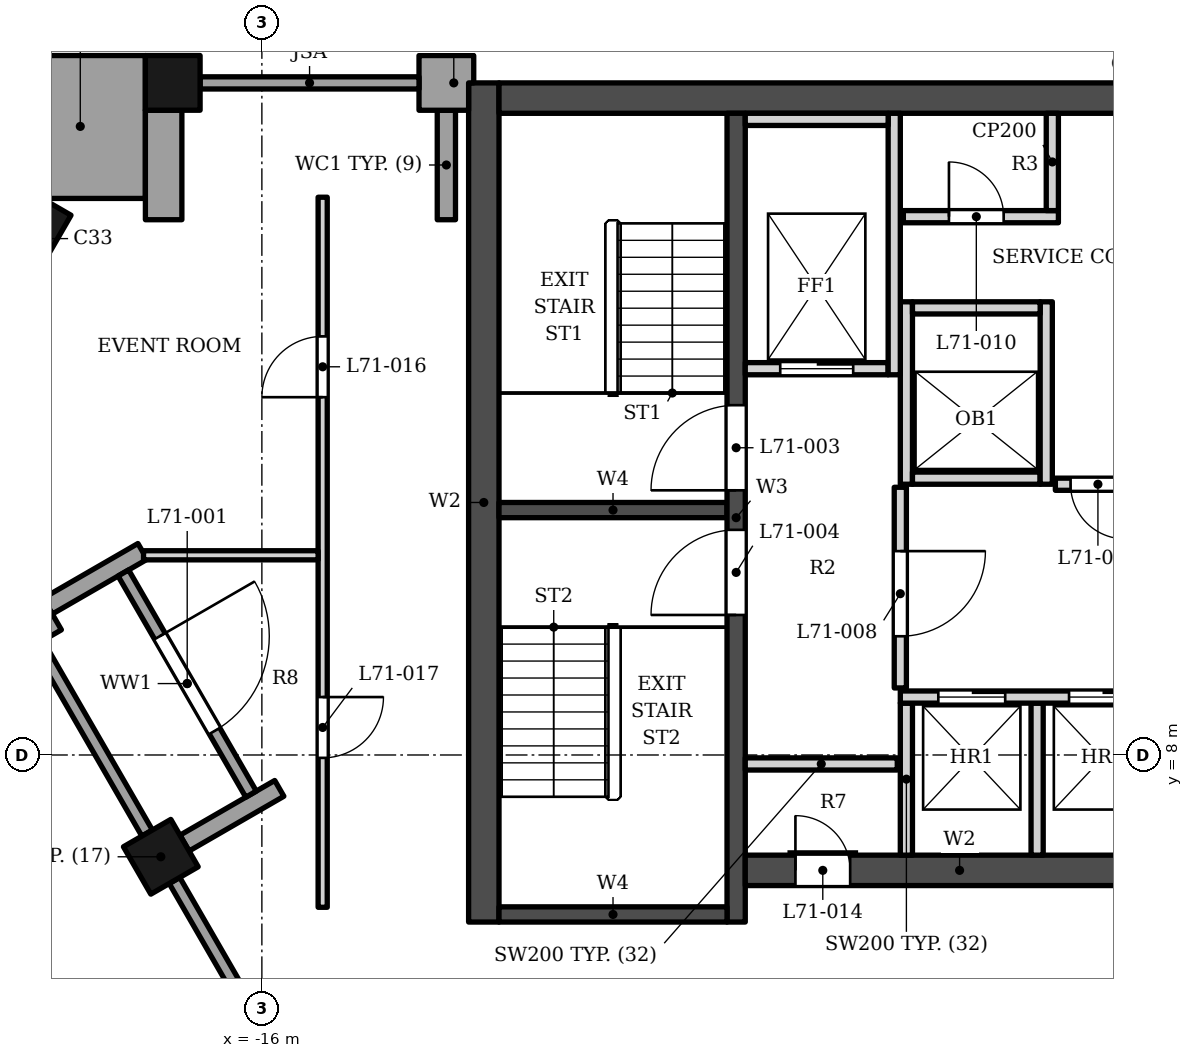
"""IFC4 building model, lengths in metres.
Left out: names, types, materials, properties, quantities, classifications, styles, units other than length and angle.
Written with IfcOpenShell. Run it as: python <this file> out.ifc"""

import sys

from ifc_helpers import new_model, si_unit, direction, frame, frame_2d, origin, origin_2d, place, context, subcontext, project, spatial, polyline, rectangle, outline, extrude, element, fill, save


model = new_model("IFC4")
c1 = context("Model", 3, precision=1e-05, world=origin(), true_north=direction((0.0, 1.0)))
c2 = subcontext(c1, "Body", "Model", "MODEL_VIEW")
j1 = project(units=[si_unit("LENGTHUNIT", "METRE"), si_unit("PLANEANGLEUNIT", "RADIAN")], contexts=[c1])
p1 = place(None, origin())
s1 = spatial("IfcSite", under=j1, at=p1, CompositionType="ELEMENT")
p2 = place(p1, origin())
s2 = spatial("IfcBuilding", under=s1, at=p2, CompositionType="ELEMENT")
p3 = place(p2, frame((0.0, 0.0, 295.0)))
s3 = spatial("IfcBuildingStorey", under=s2, at=p3, CompositionType="ELEMENT", Elevation=295.0)
p4 = place(p3, frame((-12.1, 18.802, 0.0), z_axis=(0.0, 0.0, 1.0), x_axis=(1.0, 0.0, 0.0)))
e1 = element("IfcWall", 1, at=p4, inside=s3, PredefinedType="SHEAR", context=c2, shape_type="SweptSolid", body=[
    extrude(rectangle(XDim=24.2, YDim=0.5, at=frame_2d((12.1, 0.0))), origin(), (0.0, 0.0, 1.0), 7.5),
])
p5 = place(p3, frame((-12.35, 5.253, 0.0), z_axis=(0.0, 0.0, 1.0), x_axis=(0.0, 1.0, 0.0)))
e2 = element("IfcWall", 2, at=p5, inside=s3, PredefinedType="SHEAR", context=c2, shape_type="SweptSolid", body=[
    extrude(rectangle(XDim=13.8, YDim=0.5, at=frame_2d((6.9, 0.0))), origin(), (0.0, 0.0, 1.0), 7.5),
])
p6 = place(p3, frame((-8.2, 5.253, 0.0), z_axis=(0.0, 0.0, 1.0), x_axis=(0.0, 1.0, 0.0)))
e3 = element("IfcWall", 3, at=p6, inside=s3, PredefinedType="SHEAR", context=c2, shape_type="SweptSolid", body=[
    extrude(rectangle(XDim=13.3, YDim=0.3, at=frame_2d((6.65, 0.0))), origin(), (0.0, 0.0, 1.0), 7.5),
])
p7 = place(p6, frame((7.1, 0.0, 0.0)))
e4 = element("IfcOpeningElement", 4, at=p7, cuts=e3, PredefinedType="OPENING", context=c2, shape_type="SweptSolid", body=[
    extrude(rectangle(XDim=1.4, YDim=2.1, at=frame_2d((0.7, 1.05))), frame((0.0, 0.16, 0.0), z_axis=(0.0, -1.0, 0.0), x_axis=(1.0, 0.0, 0.0)), (0.0, 0.0, 1.0), 0.32),
])
p8 = place(p6, frame((5.05, 0.0, 0.0)))
e5 = element("IfcOpeningElement", 5, at=p8, cuts=e3, PredefinedType="OPENING", context=c2, shape_type="SweptSolid", body=[
    extrude(rectangle(XDim=1.4, YDim=2.1, at=frame_2d((0.7, 1.05))), frame((0.0, 0.16, 0.0), z_axis=(0.0, -1.0, 0.0), x_axis=(1.0, 0.0, 0.0)), (0.0, 0.0, 1.0), 0.32),
])
for number, where, z_axis, x_axis in (
    (6, (-12.1, 12.028, 0.0), (0.0, 0.0, 1.0), (1.0, 0.0, 0.0)),
    (7, (-12.1, 5.378, 0.0), (0.0, 0.0, 1.0), (1.0, 0.0, 0.0)),
):
    element("IfcWall", number, at=place(p3, frame(where, z_axis=z_axis, x_axis=x_axis)), inside=s3, PredefinedType="SHEAR", context=c2, shape_type="SweptSolid", body=[
        extrude(rectangle(XDim=3.75, YDim=0.25, at=frame_2d((1.875, 0.0))), origin(), (0.0, 0.0, 1.0), 7.5),
    ])
p9 = place(p3, frame((-8.05, 6.103, 0.0), z_axis=(0.0, 0.0, 1.0), x_axis=(1.0, 0.0, 0.0)))
e8 = element("IfcWall", 8, at=p9, inside=s3, PredefinedType="SHEAR", context=c2, shape_type="SweptSolid", body=[
    extrude(rectangle(XDim=7.05, YDim=0.5, at=frame_2d((3.525, 0.0))), origin(), (0.0, 0.0, 1.0), 7.5),
])
p10 = place(p9, frame((0.825, 0.0, 0.0)))
e9 = element("IfcOpeningElement", 9, at=p10, cuts=e8, PredefinedType="OPENING", context=c2, shape_type="SweptSolid", body=[
    extrude(rectangle(XDim=0.9, YDim=2.1, at=frame_2d((0.45, 1.05))), frame((0.0, 0.26, 0.0), z_axis=(0.0, -1.0, 0.0), x_axis=(1.0, 0.0, 0.0)), (0.0, 0.0, 1.0), 0.52),
])
p11 = place(p3, frame((-20.573, 16.492, 0.0), z_axis=(0.0, 0.0, 1.0), x_axis=(0.866025395058, -0.500000015115, 0.0)))
e10 = element("IfcColumn", 10, at=p11, inside=s3, PredefinedType="COLUMN", context=c2, shape_type="SweptSolid", body=[
    extrude(rectangle(XDim=2.1, YDim=2.1, at=origin_2d()), origin(), (0.0, 0.0, 1.0), 7.5),
])
for number, where, z_axis, x_axis in (
    (11, (-17.662, 6.326, 0.0), (0.0, 0.0, 1.0), (0.5, -0.866, 0.0)),
    (12, (-17.466, 19.053, 0.0), (0.0, 0.0, 1.0), (-1.0, 0.0, 0.0)),
):
    element("IfcColumn", number, at=place(p3, frame(where, z_axis=z_axis, x_axis=x_axis)), inside=s3, PredefinedType="COLUMN", context=c2, shape_type="SweptSolid", body=[
        extrude(rectangle(XDim=0.9, YDim=0.9, at=origin_2d()), origin(), (0.0, 0.0, 1.0), 7.5),
    ])
p12 = place(p3, frame((-20.302, 9.998, 0.0), z_axis=(0.0, 0.0, 1.0), x_axis=(0.866013897511, 0.50001992892, 0.0)))
e13 = element("IfcWall", 13, at=p12, inside=s3, PredefinedType="SOLIDWALL", context=c2, shape_type="SweptSolid", body=[
    extrude(rectangle(XDim=0.9, YDim=0.9, at=frame_2d((0.45, 0.0))), origin(), (0.0, 0.0, 1.0), 6.5),
])
p13 = place(p3, frame((-17.963, 11.348, 0.0), z_axis=(0.0, 0.0, 1.0), x_axis=(-0.866047807691, -0.499961193289, 0.0)))
e14 = element("IfcWall", 14, at=p13, inside=s3, PredefinedType="SOLIDWALL", context=c2, shape_type="SweptSolid", body=[
    extrude(rectangle(XDim=1.8, YDim=0.3, at=frame_2d((0.9, 0.0))), origin(), (0.0, 0.0, 1.0), 6.5),
])
p14 = place(p3, frame((-17.272, 6.551, 0.0), z_axis=(0.0, 0.0, 1.0), x_axis=(0.865989075817, 0.500062916607, 0.0)))
e15 = element("IfcWall", 15, at=p14, inside=s3, PredefinedType="SOLIDWALL", context=c2, shape_type="SweptSolid", body=[
    extrude(rectangle(XDim=1.8, YDim=0.3, at=frame_2d((0.9, 0.0))), origin(), (0.0, 0.0, 1.0), 6.42),
])
p15 = place(p3, frame((-19.687, 9.833, 0.0), z_axis=(0.0, 0.0, 1.0), x_axis=(0.499961193289, -0.866047807691, 0.0)))
e16 = element("IfcWall", 16, at=p15, inside=s3, PredefinedType="SOLIDWALL", context=c2, shape_type="SweptSolid", body=[
    extrude(rectangle(XDim=3.6, YDim=0.2, at=frame_2d((1.8, 0.0))), origin(), (0.0, 0.0, 1.0), 6.5),
])
p16 = place(p3, frame((-18.278, 10.993, 0.0), z_axis=(0.0, 0.0, 1.0), x_axis=(0.500002543286, -0.866023935413, 0.0)))
e17 = element("IfcWall", 17, at=p16, inside=s3, PredefinedType="ELEMENTEDWALL", context=c2, shape_type="SweptSolid", body=[
    extrude(rectangle(XDim=4.2, YDim=0.2, at=frame_2d((2.1, 0.0))), origin(), (0.0, 0.0, 1.0), 6.5),
])
p17 = place(p16, frame((1.2, 0.0, 0.0)))
e18 = element("IfcOpeningElement", 18, at=p17, cuts=e17, PredefinedType="OPENING", context=c2, shape_type="SweptSolid", body=[
    extrude(rectangle(XDim=1.8, YDim=2.7, at=frame_2d((0.9, 1.35))), frame((0.0, 0.11, 0.0), z_axis=(0.0, -1.0, 0.0), x_axis=(1.0, 0.0, 0.0)), (0.0, 0.0, 1.0), 0.22),
])
p18 = place(p3, frame((-17.437, 5.936, 0.0), z_axis=(0.0, 0.0, 1.0), x_axis=(0.499961193289, -0.866047807691, 0.0)))
e19 = element("IfcWall", 19, at=p18, inside=s3, PredefinedType="SOLIDWALL", context=c2, shape_type="SweptSolid", body=[
    extrude(rectangle(XDim=3.6, YDim=0.2, at=frame_2d((1.8, 0.0))), origin(), (0.0, 0.0, 1.0), 6.5),
])
p19 = place(p3, origin())
e20 = element("IfcWall", 20, at=p19, inside=s3, PredefinedType="SOLIDWALL", context=c2, shape_type="SweptSolid", body=[
    extrude(outline(polyline([(-12.516, 19.052), (-12.516, 19.502), (-13.416, 19.502), (-13.416, 18.603), (-12.6, 18.603), (-12.6, 19.052), (-12.516, 19.052)])), origin(), (0.0, 0.0, 1.0), 6.5),
])
p20 = place(p3, origin())
e21 = element("IfcWall", 21, at=p20, inside=s3, PredefinedType="SOLIDWALL", context=c2, shape_type="SweptSolid", body=[
    extrude(outline(polyline([(-12.816, 16.802), (-12.816, 18.603), (-13.116, 18.603), (-13.116, 16.802), (-12.816, 16.802)])), origin(), (0.0, 0.0, 1.0), 6.5),
])
p21 = place(p3, origin())
e22 = element("IfcWall", 22, at=p21, inside=s3, PredefinedType="SOLIDWALL", context=c2, shape_type="SweptSolid", body=[
    extrude(outline(polyline([(-17.916, 18.603), (-17.916, 16.802), (-17.316, 16.802), (-17.316, 18.603), (-17.916, 18.603)])), origin(), (0.0, 0.0, 1.0), 6.5),
])
p22 = place(p3, frame((-13.416, 19.052, 0.0), z_axis=(0.0, 0.0, 1.0), x_axis=(-1.0, 0.0, 0.0)))
e23 = element("IfcWall", 23, at=p22, inside=s3, PredefinedType="SOLIDWALL", context=c2, shape_type="SweptSolid", body=[
    extrude(rectangle(XDim=3.6, YDim=0.2, at=frame_2d((1.8, 0.0))), origin(), (0.0, 0.0, 1.0), 6.5),
])
p23 = place(p3, origin())
e24 = element("IfcWall", 24, at=p23, inside=s3, PredefinedType="SOLIDWALL", context=c2, shape_type="SweptSolid", body=[
    extrude(outline(polyline([(-19.617, 17.153), (-17.916, 17.153), (-17.916, 18.603), (-17.916, 18.603), (-17.916, 19.502), (-20.813, 19.502), (-20.813, 17.843), (-19.617, 17.153)])), origin(), (0.0, 0.0, 1.0), 6.5),
])
for number, where, z_axis, x_axis in (
    (25, (-5.4, 6.353, 0.0), (0.0, 0.0, 1.0), (0.0, 1.0, 0.0)),
    (26, (-3.25, 6.353, 0.0), (0.0, 0.0, 1.0), (0.0, 1.0, 0.0)),
    (27, (-8.05, 7.853, 0.0), (0.0, 0.0, 1.0), (1.0, 0.0, 0.0)),
):
    element("IfcWall", number, at=place(p3, frame(where, z_axis=z_axis, x_axis=x_axis)), inside=s3, PredefinedType="SOLIDWALL", context=c2, shape_type="SweptSolid", body=[
        extrude(rectangle(XDim=2.5, YDim=0.2, at=frame_2d((1.25, 0.0))), origin(), (0.0, 0.0, 1.0), 7.2),
    ])
p24 = place(p3, frame((-5.5, 8.953, 0.0), z_axis=(0.0, 0.0, 1.0), x_axis=(1.0, 0.0, 0.0)))
e28 = element("IfcWall", 28, at=p24, inside=s3, PredefinedType="SOLIDWALL", context=c2, shape_type="SweptSolid", body=[
    extrude(rectangle(XDim=4.5, YDim=0.2, at=frame_2d((2.25, 0.0))), origin(), (0.0, 0.0, 1.0), 7.2),
])
p25 = place(p24, frame((0.625, 0.0, 0.0)))
e29 = element("IfcOpeningElement", 29, at=p25, cuts=e28, PredefinedType="OPENING", context=c2, shape_type="SweptSolid", body=[
    extrude(rectangle(XDim=1.1, YDim=2.1, at=frame_2d((0.55, 1.05))), frame((0.0, 0.11, 0.0), z_axis=(0.0, -1.0, 0.0), x_axis=(1.0, 0.0, 0.0)), (0.0, 0.0, 1.0), 0.22),
])
p26 = place(p24, frame((2.775, 0.0, 0.0)))
e30 = element("IfcOpeningElement", 30, at=p26, cuts=e28, PredefinedType="OPENING", context=c2, shape_type="SweptSolid", body=[
    extrude(rectangle(XDim=1.1, YDim=2.1, at=frame_2d((0.55, 1.05))), frame((0.0, 0.11, 0.0), z_axis=(0.0, -1.0, 0.0), x_axis=(1.0, 0.0, 0.0)), (0.0, 0.0, 1.0), 0.22),
])
p27 = place(p3, frame((-5.5, 9.103, 0.0), z_axis=(0.0, 0.0, 1.0), x_axis=(0.0, 1.0, 0.0)))
e31 = element("IfcWall", 31, at=p27, inside=s3, PredefinedType="SOLIDWALL", context=c2, shape_type="SweptSolid", body=[
    extrude(rectangle(XDim=3.3, YDim=0.2, at=frame_2d((1.65, 0.0))), origin(), (0.0, 0.0, 1.0), 7.2),
])
p28 = place(p27, frame((0.85, 0.0, 0.0)))
e32 = element("IfcOpeningElement", 32, at=p28, cuts=e31, PredefinedType="OPENING", context=c2, shape_type="SweptSolid", body=[
    extrude(rectangle(XDim=1.4, YDim=2.1, at=frame_2d((0.7, 1.05))), frame((0.0, 0.11, 0.0), z_axis=(0.0, -1.0, 0.0), x_axis=(1.0, 0.0, 0.0)), (0.0, 0.0, 1.0), 0.22),
])
p29 = place(p3, frame((-2.95, 12.453, 0.0), z_axis=(0.0, 0.0, 1.0), x_axis=(1.0, 0.0, 0.0)))
e33 = element("IfcWall", 33, at=p29, inside=s3, PredefinedType="SOLIDWALL", context=c2, shape_type="SweptSolid", body=[
    extrude(rectangle(XDim=1.4, YDim=0.2, at=frame_2d((0.7, 0.0))), origin(), (0.0, 0.0, 1.0), 7.2),
])
p30 = place(p29, frame((0.25, 0.0, 0.0)))
e34 = element("IfcOpeningElement", 34, at=p30, cuts=e33, PredefinedType="OPENING", context=c2, shape_type="SweptSolid", body=[
    extrude(rectangle(XDim=0.9, YDim=2.1, at=frame_2d((0.45, 1.05))), frame((0.0, 0.11, 0.0), z_axis=(0.0, -1.0, 0.0), x_axis=(1.0, 0.0, 0.0)), (0.0, 0.0, 1.0), 0.22),
])
p31 = place(p3, frame((-5.4, 12.453, 0.0), z_axis=(0.0, 0.0, 1.0), x_axis=(0.0, 1.0, 0.0)))
e35 = element("IfcWall", 35, at=p31, inside=s3, PredefinedType="SOLIDWALL", context=c2, shape_type="SweptSolid", body=[
    extrude(rectangle(XDim=3.0, YDim=0.2, at=frame_2d((1.5, 0.0))), origin(), (0.0, 0.0, 1.0), 7.2),
])
p32 = place(p3, frame((-5.3, 12.552, 0.0), z_axis=(0.0, 0.0, 1.0), x_axis=(1.0, 0.0, 0.0)))
e36 = element("IfcWall", 36, at=p32, inside=s3, PredefinedType="SOLIDWALL", context=c2, shape_type="SweptSolid", body=[
    extrude(rectangle(XDim=2.1, YDim=0.2, at=frame_2d((1.05, 0.0))), origin(), (0.0, 0.0, 1.0), 7.2),
])
p33 = place(p3, frame((-3.1, 12.453, 0.0), z_axis=(0.0, 0.0, 1.0), x_axis=(0.0, 1.0, 0.0)))
e37 = element("IfcWall", 37, at=p33, inside=s3, PredefinedType="SOLIDWALL", context=c2, shape_type="SweptSolid", body=[
    extrude(rectangle(XDim=3.0, YDim=0.2, at=frame_2d((1.5, 0.0))), origin(), (0.0, 0.0, 1.0), 7.2),
])
p34 = place(p3, frame((-8.05, 14.353, 0.0), z_axis=(0.0, 0.0, 1.0), x_axis=(1.0, 0.0, 0.0)))
e38 = element("IfcWall", 38, at=p34, inside=s3, PredefinedType="SOLIDWALL", context=c2, shape_type="SweptSolid", body=[
    extrude(rectangle(XDim=2.35, YDim=0.2, at=frame_2d((1.175, 0.0))), origin(), (0.0, 0.0, 1.0), 7.2),
])
p35 = place(p34, frame((0.575, 0.0, 0.0)))
e39 = element("IfcOpeningElement", 39, at=p35, cuts=e38, PredefinedType="OPENING", context=c2, shape_type="SweptSolid", body=[
    extrude(rectangle(XDim=1.2, YDim=2.1, at=frame_2d((0.6, 1.05))), frame((0.0, 0.11, 0.0), z_axis=(0.0, -1.0, 0.0), x_axis=(1.0, 0.0, 0.0)), (0.0, 0.0, 1.0), 0.22),
])
p36 = place(p3, frame((-5.6, 14.253, 0.0), z_axis=(0.0, 0.0, 1.0), x_axis=(0.0, 1.0, 0.0)))
e40 = element("IfcWall", 40, at=p36, inside=s3, PredefinedType="SOLIDWALL", context=c2, shape_type="SweptSolid", body=[
    extrude(rectangle(XDim=4.3, YDim=0.2, at=frame_2d((2.15, 0.0))), origin(), (0.0, 0.0, 1.0), 7.2),
])
p37 = place(p3, frame((-5.3, 15.353, 0.0), z_axis=(0.0, 0.0, 1.0), x_axis=(1.0, 0.0, 0.0)))
e41 = element("IfcWall", 41, at=p37, inside=s3, PredefinedType="SOLIDWALL", context=c2, shape_type="SweptSolid", body=[
    extrude(rectangle(XDim=2.1, YDim=0.2, at=frame_2d((1.05, 0.0))), origin(), (0.0, 0.0, 1.0), 7.2),
])
p38 = place(p3, frame((-5.45, 16.853, 0.0), z_axis=(0.0, 0.0, 1.0), x_axis=(1.0, 0.0, 0.0)))
e42 = element("IfcWall", 42, at=p38, inside=s3, PredefinedType="SOLIDWALL", context=c2, shape_type="SweptSolid", body=[
    extrude(rectangle(XDim=2.55, YDim=0.2, at=frame_2d((1.275, 0.0))), origin(), (0.0, 0.0, 1.0), 7.2),
])
p39 = place(p38, frame((0.75, 0.0, 0.0)))
e43 = element("IfcOpeningElement", 43, at=p39, cuts=e42, PredefinedType="OPENING", context=c2, shape_type="SweptSolid", body=[
    extrude(rectangle(XDim=0.9, YDim=2.1, at=frame_2d((0.45, 1.05))), frame((0.0, 0.11, 0.0), z_axis=(0.0, -1.0, 0.0), x_axis=(1.0, 0.0, 0.0)), (0.0, 0.0, 1.0), 0.22),
])
p40 = place(p3, frame((-3.0, 16.953, 0.0), z_axis=(0.0, 0.0, 1.0), x_axis=(0.0, 1.0, 0.0)))
e44 = element("IfcWall", 44, at=p40, inside=s3, PredefinedType="PARTITIONING", context=c2, shape_type="SweptSolid", body=[
    extrude(rectangle(XDim=1.6, YDim=0.2, at=frame_2d((0.8, 0.0))), origin(), (0.0, 0.0, 1.0), 7.2),
])
p41 = place(p3, frame((-8.05, 18.453, 0.0), z_axis=(0.0, 0.0, 1.0), x_axis=(1.0, 0.0, 0.0)))
e45 = element("IfcWall", 45, at=p41, inside=s3, PredefinedType="SOLIDWALL", context=c2, shape_type="SweptSolid", body=[
    extrude(rectangle(XDim=2.35, YDim=0.2, at=frame_2d((1.175, 0.0))), origin(), (0.0, 0.0, 1.0), 7.2),
])
p42 = place(p3, frame((-15.0, 5.495, 0.0), z_axis=(0.0, 0.0, 1.0), x_axis=(0.0, 1.0, 0.0)))
e46 = element("IfcWall", 46, at=p42, inside=s3, PredefinedType="PARTITIONING", context=c2, shape_type="SweptSolid", body=[
    extrude(rectangle(XDim=11.677, YDim=0.15, at=frame_2d((5.839, 0.0))), origin(), (0.0, 0.0, 1.0), 6.42),
])
p43 = place(p42, frame((8.389, 0.0, 0.0)))
e47 = element("IfcOpeningElement", 47, at=p43, cuts=e46, PredefinedType="OPENING", context=c2, shape_type="SweptSolid", body=[
    extrude(rectangle(XDim=1.0, YDim=2.1, at=frame_2d((0.5, 1.05))), frame((0.0, 0.085, 0.0), z_axis=(0.0, -1.0, 0.0), x_axis=(1.0, 0.0, 0.0)), (0.0, 0.0, 1.0), 0.17),
])
p44 = place(p42, frame((2.457, 0.0, 0.0)))
e48 = element("IfcOpeningElement", 48, at=p44, cuts=e46, PredefinedType="OPENING", context=c2, shape_type="SweptSolid", body=[
    extrude(rectangle(XDim=1.0, YDim=2.1, at=frame_2d((0.5, 1.05))), frame((0.0, 0.085, 0.0), z_axis=(0.0, -1.0, 0.0), x_axis=(1.0, 0.0, 0.0)), (0.0, 0.0, 1.0), 0.17),
])
p45 = place(p3, frame((-17.946, 11.284, 0.0), z_axis=(0.0, 0.0, 1.0), x_axis=(1.0, 0.0, 0.0)))
e49 = element("IfcWall", 49, at=p45, inside=s3, PredefinedType="PARTITIONING", context=c2, shape_type="SweptSolid", body=[
    extrude(rectangle(XDim=2.871, YDim=0.15, at=frame_2d((1.436, 0.0))), origin(), (0.0, 0.0, 1.0), 6.598),
])
p46 = place(p17, origin())
e50 = element("IfcDoor", 50, at=p46, inside=s3, OperationType="SINGLE_SWING_LEFT", PredefinedType="DOOR", context=c2, shape_type="SweptSolid", body=[
    extrude(rectangle(XDim=1.8, YDim=2.7, at=frame_2d((0.9, 1.35))), frame((0.0, 0.025, 0.0), z_axis=(0.0, -1.0, 0.0), x_axis=(1.0, 0.0, 0.0)), (0.0, 0.0, 1.0), 0.05),
])
fill(e18, e50)
p47 = place(p25, origin())
e51 = element("IfcDoor", 51, at=p47, inside=s3, OperationType="DOUBLE_DOOR_SLIDING", PredefinedType="DOOR", context=c2, shape_type="SweptSolid", body=[
    extrude(rectangle(XDim=1.1, YDim=2.1, at=frame_2d((0.55, 1.05))), frame((0.0, 0.025, 0.0), z_axis=(0.0, -1.0, 0.0), x_axis=(1.0, 0.0, 0.0)), (0.0, 0.0, 1.0), 0.05),
])
fill(e29, e51)
p48 = place(p26, origin())
e52 = element("IfcDoor", 52, at=p48, inside=s3, OperationType="DOUBLE_DOOR_SLIDING", PredefinedType="DOOR", context=c2, shape_type="SweptSolid", body=[
    extrude(rectangle(XDim=1.1, YDim=2.1, at=frame_2d((0.55, 1.05))), frame((0.0, 0.025, 0.0), z_axis=(0.0, -1.0, 0.0), x_axis=(1.0, 0.0, 0.0)), (0.0, 0.0, 1.0), 0.05),
])
fill(e30, e52)
p49 = place(p35, origin())
e53 = element("IfcDoor", 53, at=p49, inside=s3, OperationType="DOUBLE_DOOR_SLIDING", PredefinedType="DOOR", context=c2, shape_type="SweptSolid", body=[
    extrude(rectangle(XDim=1.2, YDim=2.1, at=frame_2d((0.6, 1.05))), frame((0.0, 0.025, 0.0), z_axis=(0.0, -1.0, 0.0), x_axis=(1.0, 0.0, 0.0)), (0.0, 0.0, 1.0), 0.05),
])
fill(e39, e53)
p50 = place(p7, origin())
e54 = element("IfcDoor", 54, at=p50, inside=s3, OperationType="SINGLE_SWING_LEFT", PredefinedType="DOOR", context=c2, shape_type="SweptSolid", body=[
    extrude(rectangle(XDim=1.4, YDim=2.1, at=frame_2d((0.7, 1.05))), frame((0.0, 0.025, 0.0), z_axis=(0.0, -1.0, 0.0), x_axis=(1.0, 0.0, 0.0)), (0.0, 0.0, 1.0), 0.05),
])
fill(e4, e54)
p51 = place(p8, origin())
e55 = element("IfcDoor", 55, at=p51, inside=s3, OperationType="SINGLE_SWING_LEFT", PredefinedType="DOOR", context=c2, shape_type="SweptSolid", body=[
    extrude(rectangle(XDim=1.4, YDim=2.1, at=frame_2d((0.7, 1.05))), frame((0.0, 0.025, 0.0), z_axis=(0.0, -1.0, 0.0), x_axis=(1.0, 0.0, 0.0)), (0.0, 0.0, 1.0), 0.05),
])
fill(e5, e55)
p52 = place(p30, origin())
e56 = element("IfcDoor", 56, at=p52, inside=s3, OperationType="SINGLE_SWING_RIGHT", PredefinedType="DOOR", context=c2, shape_type="SweptSolid", body=[
    extrude(rectangle(XDim=0.9, YDim=2.1, at=frame_2d((0.45, 1.05))), frame((0.0, 0.025, 0.0), z_axis=(0.0, -1.0, 0.0), x_axis=(1.0, 0.0, 0.0)), (0.0, 0.0, 1.0), 0.05),
])
fill(e34, e56)
p53 = place(p28, origin())
e57 = element("IfcDoor", 57, at=p53, inside=s3, OperationType="SINGLE_SWING_RIGHT", PredefinedType="DOOR", context=c2, shape_type="SweptSolid", body=[
    extrude(rectangle(XDim=1.4, YDim=2.1, at=frame_2d((0.7, 1.05))), frame((0.0, 0.025, 0.0), z_axis=(0.0, -1.0, 0.0), x_axis=(1.0, 0.0, 0.0)), (0.0, 0.0, 1.0), 0.05),
])
fill(e32, e57)
p54 = place(p39, origin())
e58 = element("IfcDoor", 58, at=p54, inside=s3, OperationType="SINGLE_SWING_LEFT", PredefinedType="DOOR", context=c2, shape_type="SweptSolid", body=[
    extrude(rectangle(XDim=0.9, YDim=2.1, at=frame_2d((0.45, 1.05))), frame((0.0, 0.025, 0.0), z_axis=(0.0, -1.0, 0.0), x_axis=(1.0, 0.0, 0.0)), (0.0, 0.0, 1.0), 0.05),
])
fill(e43, e58)
p55 = place(p10, origin())
e59 = element("IfcDoor", 59, at=p55, inside=s3, OperationType="SINGLE_SWING_LEFT", PredefinedType="DOOR", context=c2, shape_type="SweptSolid", body=[
    extrude(rectangle(XDim=0.9, YDim=2.1, at=frame_2d((0.45, 1.05))), frame((0.0, 0.025, 0.0), z_axis=(0.0, -1.0, 0.0), x_axis=(1.0, 0.0, 0.0)), (0.0, 0.0, 1.0), 0.05),
])
fill(e9, e59)
p56 = place(p43, origin())
e60 = element("IfcDoor", 60, at=p56, inside=s3, OperationType="SINGLE_SWING_LEFT", PredefinedType="DOOR", context=c2, shape_type="SweptSolid", body=[
    extrude(rectangle(XDim=1.0, YDim=2.1, at=frame_2d((0.5, 1.05))), frame((0.0, 0.025, 0.0), z_axis=(0.0, -1.0, 0.0), x_axis=(1.0, 0.0, 0.0)), (0.0, 0.0, 1.0), 0.05),
])
fill(e47, e60)
p57 = place(p44, origin())
e61 = element("IfcDoor", 61, at=p57, inside=s3, OperationType="SINGLE_SWING_RIGHT", PredefinedType="DOOR", context=c2, shape_type="SweptSolid", body=[
    extrude(rectangle(XDim=1.0, YDim=2.1, at=frame_2d((0.5, 1.05))), frame((0.0, 0.025, 0.0), z_axis=(0.0, -1.0, 0.0), x_axis=(1.0, 0.0, 0.0)), (0.0, 0.0, 1.0), 0.05),
])
fill(e48, e61)
save(model, sys.argv[1])
